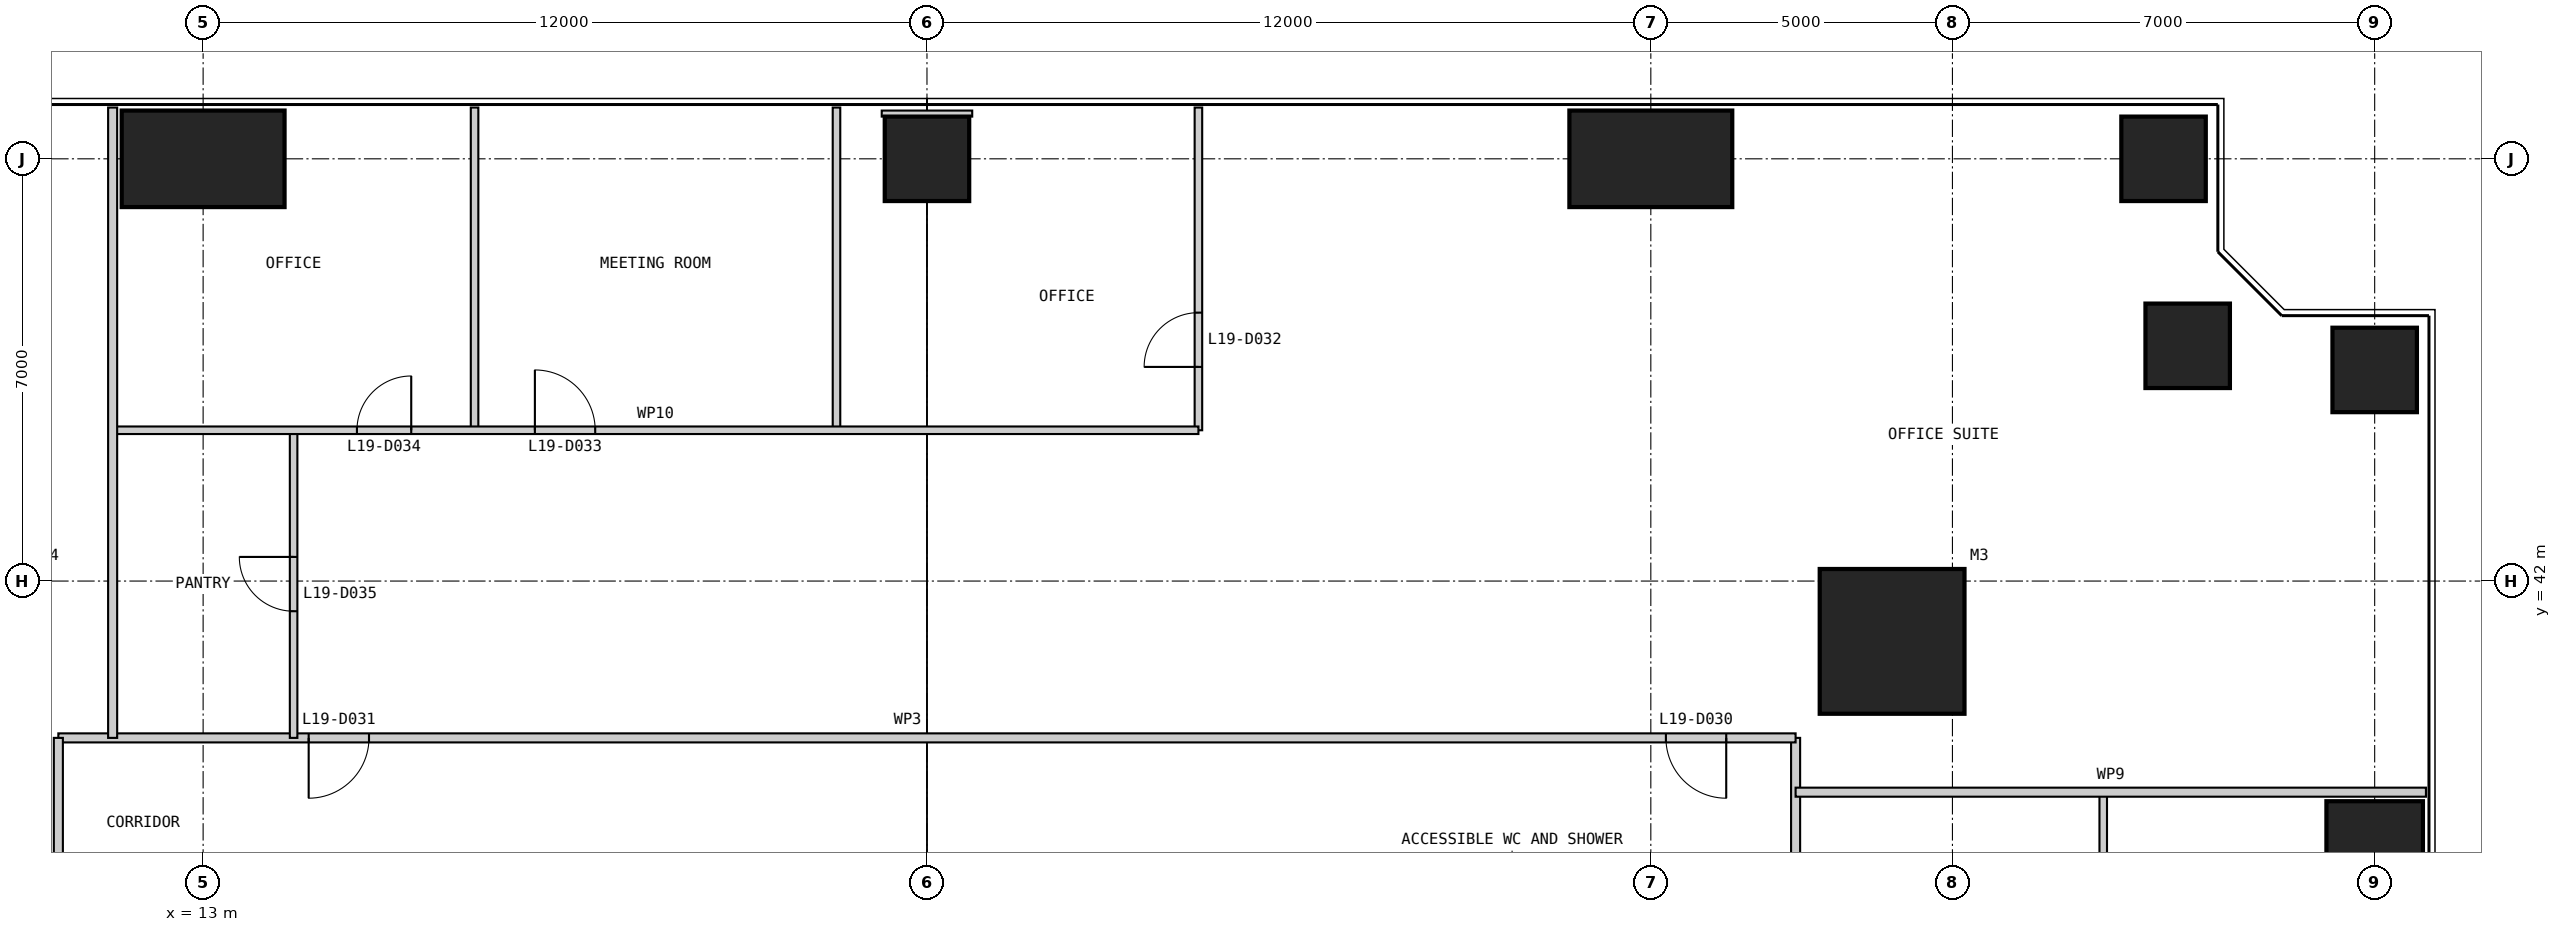
"""IFC4 building model, lengths in metres.
Left out: names, types, materials, properties, quantities, classifications, styles, units other than length and angle.
Written with IfcOpenShell. Run it as: python <this file> out.ifc"""

import sys

from ifc_helpers import new_model, si_unit, direction, frame, frame_2d, origin, origin_2d, place, context, subcontext, project, spatial, rectangle, extrude, element, fill, save


model = new_model("IFC4")
c1 = context("Model", 3, precision=1e-05, world=origin(), true_north=direction((0.0, 1.0)))
c2 = subcontext(c1, "Body", "Model", "MODEL_VIEW")
j1 = project(units=[si_unit("LENGTHUNIT", "METRE"), si_unit("PLANEANGLEUNIT", "RADIAN")], contexts=[c1])
p1 = place(None, origin())
s1 = spatial("IfcSite", under=j1, at=p1, CompositionType="ELEMENT")
p2 = place(p1, origin())
s2 = spatial("IfcBuilding", under=s1, at=p2, CompositionType="ELEMENT")
p3 = place(p2, frame((0.0, 0.0, 83.0)))
s3 = spatial("IfcBuildingStorey", under=s2, at=p3, CompositionType="ELEMENT", Elevation=83.0)
p4 = place(p3, frame((41.0, 41.0, 0.0), z_axis=(0.0, 0.0, 1.0), x_axis=(1.0, 0.0, 0.0)))
e1 = element("IfcColumn", 1, at=p4, inside=s3, PredefinedType="COLUMN", context=c2, shape_type="SweptSolid", body=[
    extrude(rectangle(XDim=2.4, YDim=2.4, at=origin_2d()), origin(), (0.0, 0.0, 1.0), 4.0),
])
p5 = place(p3, frame((49.0, 37.0, 0.0), z_axis=(0.0, 0.0, 1.0), x_axis=(1.0, 0.0, 0.0)))
e2 = element("IfcColumn", 2, at=p5, inside=s3, PredefinedType="COLUMN", context=c2, shape_type="SweptSolid", body=[
    extrude(rectangle(XDim=1.6, YDim=2.7, at=origin_2d()), origin(), (0.0, 0.0, 1.0), 4.0),
])
for number, where, z_axis, x_axis in (
    (3, (49.0, 45.5, 0.0), (0.0, 0.0, 1.0), (1.0, 0.0, 0.0)),
    (4, (45.9, 45.9, 0.0), (0.0, 0.0, 1.0), (1.0, 0.0, 0.0)),
    (5, (45.5, 49.0, 0.0), (0.0, 0.0, 1.0), (1.0, 0.0, 0.0)),
):
    element("IfcColumn", number, at=place(p3, frame(where, z_axis=z_axis, x_axis=x_axis)), inside=s3, PredefinedType="COLUMN", context=c2, shape_type="SweptSolid", body=[
        extrude(rectangle(XDim=1.4, YDim=1.4, at=origin_2d()), origin(), (0.0, 0.0, 1.0), 4.0),
    ])
p6 = place(p3, frame((37.0, 49.0, 0.0), z_axis=(0.0, 0.0, 1.0), x_axis=(1.0, 0.0, 0.0)))
e6 = element("IfcColumn", 6, at=p6, inside=s3, PredefinedType="COLUMN", context=c2, shape_type="SweptSolid", body=[
    extrude(rectangle(XDim=2.7, YDim=1.6, at=origin_2d()), origin(), (0.0, 0.0, 1.0), 4.0),
])
p7 = place(p3, frame((25.0, 49.0, 0.0), z_axis=(0.0, 0.0, 1.0), x_axis=(1.0, 0.0, 0.0)))
e7 = element("IfcColumn", 7, at=p7, inside=s3, PredefinedType="COLUMN", context=c2, shape_type="SweptSolid", body=[
    extrude(rectangle(XDim=1.4, YDim=1.4, at=origin_2d()), origin(), (0.0, 0.0, 1.0), 4.0),
])
p8 = place(p3, frame((13.0, 49.0, 0.0), z_axis=(0.0, 0.0, 1.0), x_axis=(1.0, 0.0, 0.0)))
e8 = element("IfcColumn", 8, at=p8, inside=s3, PredefinedType="COLUMN", context=c2, shape_type="SweptSolid", body=[
    extrude(rectangle(XDim=2.7, YDim=1.6, at=origin_2d()), origin(), (0.0, 0.0, 1.0), 4.0),
])
p9 = place(p3, frame((39.4, 11.5, 0.0), z_axis=(0.0, 0.0, 1.0), x_axis=(0.0, 1.0, 0.0)))
e9 = element("IfcWall", 9, at=p9, inside=s3, PredefinedType="PARTITIONING", context=c2, shape_type="SweptSolid", body=[
    extrude(rectangle(XDim=27.9, YDim=0.15, at=frame_2d((13.95, 0.0))), origin(), (0.0, 0.0, 1.0), 3.85),
])
p10 = place(p9, frame((0.25, 0.0, 0.0)))
e10 = element("IfcOpeningElement", 10, at=p10, cuts=e9, PredefinedType="OPENING", context=c2, shape_type="SweptSolid", body=[
    extrude(rectangle(XDim=1.0, YDim=2.2, at=frame_2d((0.5, 1.1))), frame((0.0, 0.085, 0.0), z_axis=(0.0, -1.0, 0.0), x_axis=(1.0, 0.0, 0.0)), (0.0, 0.0, 1.0), 0.17),
])
p11 = place(p9, frame((22.75, 0.0, 0.0)))
e11 = element("IfcOpeningElement", 11, at=p11, cuts=e9, PredefinedType="OPENING", context=c2, shape_type="SweptSolid", body=[
    extrude(rectangle(XDim=1.0, YDim=2.2, at=frame_2d((0.5, 1.1))), frame((0.0, 0.085, 0.0), z_axis=(0.0, -1.0, 0.0), x_axis=(1.0, 0.0, 0.0)), (0.0, 0.0, 1.0), 0.17),
])
p12 = place(p3, frame((44.5, 20.5, 0.0), z_axis=(0.0, 0.0, 1.0), x_axis=(0.0, 1.0, 0.0)))
e12 = element("IfcWall", 12, at=p12, inside=s3, PredefinedType="PARTITIONING", context=c2, shape_type="SweptSolid", body=[
    extrude(rectangle(XDim=18.0, YDim=0.125, at=frame_2d((9.0, 0.0))), origin(), (0.0, 0.0, 1.0), 3.85),
])
p13 = place(p12, frame((10.0, 0.0, 0.0)))
e13 = element("IfcOpeningElement", 13, at=p13, cuts=e12, PredefinedType="OPENING", context=c2, shape_type="SweptSolid", body=[
    extrude(rectangle(XDim=1.0, YDim=2.2, at=frame_2d((0.5, 1.1))), frame((0.0, 0.073, 0.0), z_axis=(0.0, -1.0, 0.0), x_axis=(1.0, 0.0, 0.0)), (0.0, 0.0, 1.0), 0.145),
])
p14 = place(p12, frame((13.05, 0.0, 0.0)))
e14 = element("IfcOpeningElement", 14, at=p14, cuts=e12, PredefinedType="OPENING", context=c2, shape_type="SweptSolid", body=[
    extrude(rectangle(XDim=0.9, YDim=2.2, at=frame_2d((0.45, 1.1))), frame((0.0, 0.073, 0.0), z_axis=(0.0, -1.0, 0.0), x_axis=(1.0, 0.0, 0.0)), (0.0, 0.0, 1.0), 0.145),
])
p15 = place(p3, frame((39.4, 39.4, 0.0), z_axis=(0.0, 0.0, 1.0), x_axis=(-1.0, 0.0, 0.0)))
e15 = element("IfcWall", 15, at=p15, inside=s3, PredefinedType="PARTITIONING", context=c2, shape_type="SweptSolid", body=[
    extrude(rectangle(XDim=28.8, YDim=0.15, at=frame_2d((14.4, 0.0))), origin(), (0.0, 0.0, 1.0), 3.85),
])
p16 = place(p15, frame((1.15, 0.0, 0.0)))
e16 = element("IfcOpeningElement", 16, at=p16, cuts=e15, PredefinedType="OPENING", context=c2, shape_type="SweptSolid", body=[
    extrude(rectangle(XDim=1.0, YDim=2.2, at=frame_2d((0.5, 1.1))), frame((0.0, 0.085, 0.0), z_axis=(0.0, -1.0, 0.0), x_axis=(1.0, 0.0, 0.0)), (0.0, 0.0, 1.0), 0.17),
])
p17 = place(p15, frame((23.65, 0.0, 0.0)))
e17 = element("IfcOpeningElement", 17, at=p17, cuts=e15, PredefinedType="OPENING", context=c2, shape_type="SweptSolid", body=[
    extrude(rectangle(XDim=1.0, YDim=2.2, at=frame_2d((0.5, 1.1))), frame((0.0, 0.085, 0.0), z_axis=(0.0, -1.0, 0.0), x_axis=(1.0, 0.0, 0.0)), (0.0, 0.0, 1.0), 0.17),
])
p18 = place(p3, frame((49.85, 38.5, 0.0), z_axis=(0.0, 0.0, 1.0), x_axis=(-1.0, 0.0, 0.0)))
e18 = element("IfcWall", 18, at=p18, inside=s3, PredefinedType="PARTITIONING", context=c2, shape_type="SweptSolid", body=[
    extrude(rectangle(XDim=10.45, YDim=0.15, at=frame_2d((5.225, 0.0))), origin(), (0.0, 0.0, 1.0), 3.85),
])
p19 = place(p3, frame((29.5, 49.85, 0.0), z_axis=(0.0, 0.0, 1.0), x_axis=(0.0, -1.0, 0.0)))
e19 = element("IfcWall", 19, at=p19, inside=s3, PredefinedType="PARTITIONING", context=c2, shape_type="SweptSolid", body=[
    extrude(rectangle(XDim=5.35, YDim=0.125, at=frame_2d((2.675, 0.0))), origin(), (0.0, 0.0, 1.0), 3.85),
])
p20 = place(p19, frame((3.4, 0.0, 0.0)))
e20 = element("IfcOpeningElement", 20, at=p20, cuts=e19, PredefinedType="OPENING", context=c2, shape_type="SweptSolid", body=[
    extrude(rectangle(XDim=0.9, YDim=2.2, at=frame_2d((0.45, 1.1))), frame((0.0, 0.073, 0.0), z_axis=(0.0, -1.0, 0.0), x_axis=(1.0, 0.0, 0.0)), (0.0, 0.0, 1.0), 0.145),
])
for number, where, z_axis, x_axis in (
    (21, (23.5, 49.85, 0.0), (0.0, 0.0, 1.0), (0.0, -1.0, 0.0)),
    (22, (17.5, 49.85, 0.0), (0.0, 0.0, 1.0), (0.0, -1.0, 0.0)),
):
    element("IfcWall", number, at=place(p3, frame(where, z_axis=z_axis, x_axis=x_axis)), inside=s3, PredefinedType="PARTITIONING", context=c2, shape_type="SweptSolid", body=[
        extrude(rectangle(XDim=5.35, YDim=0.125, at=frame_2d((2.675, 0.0))), origin(), (0.0, 0.0, 1.0), 3.85),
    ])
p21 = place(p3, frame((14.5, 44.5, 0.0), z_axis=(0.0, 0.0, 1.0), x_axis=(0.0, -1.0, 0.0)))
e23 = element("IfcWall", 23, at=p21, inside=s3, PredefinedType="PARTITIONING", context=c2, shape_type="SweptSolid", body=[
    extrude(rectangle(XDim=5.1, YDim=0.125, at=frame_2d((2.55, 0.0))), origin(), (0.0, 0.0, 1.0), 3.85),
])
p22 = place(p21, frame((2.1, 0.0, 0.0)))
e24 = element("IfcOpeningElement", 24, at=p22, cuts=e23, PredefinedType="OPENING", context=c2, shape_type="SweptSolid", body=[
    extrude(rectangle(XDim=0.9, YDim=2.2, at=frame_2d((0.45, 1.1))), frame((0.0, 0.073, 0.0), z_axis=(0.0, -1.0, 0.0), x_axis=(1.0, 0.0, 0.0)), (0.0, 0.0, 1.0), 0.145),
])
p23 = place(p3, frame((29.5, 44.5, 0.0), z_axis=(0.0, 0.0, 1.0), x_axis=(-1.0, 0.0, 0.0)))
e25 = element("IfcWall", 25, at=p23, inside=s3, PredefinedType="PARTITIONING", context=c2, shape_type="SweptSolid", body=[
    extrude(rectangle(XDim=18.0, YDim=0.125, at=frame_2d((9.0, 0.0))), origin(), (0.0, 0.0, 1.0), 3.85),
])
p24 = place(p23, frame((10.0, 0.0, 0.0)))
e26 = element("IfcOpeningElement", 26, at=p24, cuts=e25, PredefinedType="OPENING", context=c2, shape_type="SweptSolid", body=[
    extrude(rectangle(XDim=1.0, YDim=2.2, at=frame_2d((0.5, 1.1))), frame((0.0, 0.073, 0.0), z_axis=(0.0, -1.0, 0.0), x_axis=(1.0, 0.0, 0.0)), (0.0, 0.0, 1.0), 0.145),
])
p25 = place(p23, frame((13.05, 0.0, 0.0)))
e27 = element("IfcOpeningElement", 27, at=p25, cuts=e25, PredefinedType="OPENING", context=c2, shape_type="SweptSolid", body=[
    extrude(rectangle(XDim=0.9, YDim=2.2, at=frame_2d((0.45, 1.1))), frame((0.0, 0.073, 0.0), z_axis=(0.0, -1.0, 0.0), x_axis=(1.0, 0.0, 0.0)), (0.0, 0.0, 1.0), 0.145),
])
p26 = place(p3, frame((10.6, 39.4, 0.0), z_axis=(0.0, 0.0, 1.0), x_axis=(0.0, -1.0, 0.0)))
e28 = element("IfcWall", 28, at=p26, inside=s3, PredefinedType="PARTITIONING", context=c2, shape_type="SweptSolid", body=[
    extrude(rectangle(XDim=27.9, YDim=0.15, at=frame_2d((13.95, 0.0))), origin(), (0.0, 0.0, 1.0), 3.85),
])
p27 = place(p26, frame((3.4, 0.0, 0.0)))
e29 = element("IfcOpeningElement", 29, at=p27, cuts=e28, PredefinedType="OPENING", context=c2, shape_type="SweptSolid", body=[
    extrude(rectangle(XDim=1.0, YDim=2.2, at=frame_2d((0.5, 1.1))), frame((0.0, 0.085, 0.0), z_axis=(0.0, -1.0, 0.0), x_axis=(1.0, 0.0, 0.0)), (0.0, 0.0, 1.0), 0.17),
])
p28 = place(p26, frame((10.15, 0.0, 0.0)))
e30 = element("IfcOpeningElement", 30, at=p28, cuts=e28, PredefinedType="OPENING", context=c2, shape_type="SweptSolid", body=[
    extrude(rectangle(XDim=1.0, YDim=2.2, at=frame_2d((0.5, 1.1))), frame((0.0, 0.085, 0.0), z_axis=(0.0, -1.0, 0.0), x_axis=(1.0, 0.0, 0.0)), (0.0, 0.0, 1.0), 0.17),
])
p29 = place(p26, frame((17.65, 0.0, 0.0)))
e31 = element("IfcOpeningElement", 31, at=p29, cuts=e28, PredefinedType="OPENING", context=c2, shape_type="SweptSolid", body=[
    extrude(rectangle(XDim=1.0, YDim=2.2, at=frame_2d((0.5, 1.1))), frame((0.0, 0.085, 0.0), z_axis=(0.0, -1.0, 0.0), x_axis=(1.0, 0.0, 0.0)), (0.0, 0.0, 1.0), 0.17),
])
p30 = place(p26, frame((24.4, 0.0, 0.0)))
e32 = element("IfcOpeningElement", 32, at=p30, cuts=e28, PredefinedType="OPENING", context=c2, shape_type="SweptSolid", body=[
    extrude(rectangle(XDim=1.0, YDim=2.2, at=frame_2d((0.5, 1.1))), frame((0.0, 0.085, 0.0), z_axis=(0.0, -1.0, 0.0), x_axis=(1.0, 0.0, 0.0)), (0.0, 0.0, 1.0), 0.17),
])
p31 = place(p3, frame((11.5, 49.85, 0.0), z_axis=(0.0, 0.0, 1.0), x_axis=(0.0, -1.0, 0.0)))
e33 = element("IfcWall", 33, at=p31, inside=s3, PredefinedType="PARTITIONING", context=c2, shape_type="SweptSolid", body=[
    extrude(rectangle(XDim=10.45, YDim=0.15, at=frame_2d((5.225, 0.0))), origin(), (0.0, 0.0, 1.0), 3.85),
])
p32 = place(p3, frame((25.0, 49.8, 0.0), z_axis=(0.0, 0.0, 1.0), x_axis=(0.0, -1.0, 0.0)))
e34 = element("IfcWall", 34, at=p32, inside=s3, PredefinedType="PARTITIONING", context=c2, shape_type="SweptSolid", body=[
    extrude(rectangle(XDim=0.1, YDim=1.5, at=frame_2d((0.05, 0.0))), origin(), (0.0, 0.0, 1.0), 3.85),
])
p33 = place(p16, origin())
e35 = element("IfcDoor", 35, at=p33, inside=s3, OperationType="SINGLE_SWING_LEFT", PredefinedType="DOOR", context=c2, shape_type="SweptSolid", body=[
    extrude(rectangle(XDim=1.0, YDim=2.2, at=frame_2d((0.5, 1.1))), frame((0.0, 0.025, 0.0), z_axis=(0.0, -1.0, 0.0), x_axis=(1.0, 0.0, 0.0)), (0.0, 0.0, 1.0), 0.05),
])
fill(e16, e35)
p34 = place(p17, origin())
e36 = element("IfcDoor", 36, at=p34, inside=s3, OperationType="SINGLE_SWING_RIGHT", PredefinedType="DOOR", context=c2, shape_type="SweptSolid", body=[
    extrude(rectangle(XDim=1.0, YDim=2.2, at=frame_2d((0.5, 1.1))), frame((0.0, 0.025, 0.0), z_axis=(0.0, -1.0, 0.0), x_axis=(1.0, 0.0, 0.0)), (0.0, 0.0, 1.0), 0.05),
])
fill(e17, e36)
p35 = place(p20, frame((0.9, 0.0, 0.0), z_axis=(0.0, 0.0, 1.0), x_axis=(-1.0, 0.0, 0.0)))
e37 = element("IfcDoor", 37, at=p35, inside=s3, OperationType="SINGLE_SWING_LEFT", PredefinedType="DOOR", context=c2, shape_type="SweptSolid", body=[
    extrude(rectangle(XDim=0.9, YDim=2.2, at=frame_2d((0.45, 1.1))), frame((0.0, 0.025, 0.0), z_axis=(0.0, -1.0, 0.0), x_axis=(1.0, 0.0, 0.0)), (0.0, 0.0, 1.0), 0.05),
])
fill(e20, e37)
p36 = place(p24, frame((1.0, 0.0, 0.0), z_axis=(0.0, 0.0, 1.0), x_axis=(-1.0, 0.0, 0.0)))
e38 = element("IfcDoor", 38, at=p36, inside=s3, OperationType="SINGLE_SWING_LEFT", PredefinedType="DOOR", context=c2, shape_type="SweptSolid", body=[
    extrude(rectangle(XDim=1.0, YDim=2.2, at=frame_2d((0.5, 1.1))), frame((0.0, 0.025, 0.0), z_axis=(0.0, -1.0, 0.0), x_axis=(1.0, 0.0, 0.0)), (0.0, 0.0, 1.0), 0.05),
])
fill(e26, e38)
p37 = place(p25, frame((0.9, 0.0, 0.0), z_axis=(0.0, 0.0, 1.0), x_axis=(-1.0, 0.0, 0.0)))
e39 = element("IfcDoor", 39, at=p37, inside=s3, OperationType="SINGLE_SWING_RIGHT", PredefinedType="DOOR", context=c2, shape_type="SweptSolid", body=[
    extrude(rectangle(XDim=0.9, YDim=2.2, at=frame_2d((0.45, 1.1))), frame((0.0, 0.025, 0.0), z_axis=(0.0, -1.0, 0.0), x_axis=(1.0, 0.0, 0.0)), (0.0, 0.0, 1.0), 0.05),
])
fill(e27, e39)
p38 = place(p22, frame((0.9, 0.0, 0.0), z_axis=(0.0, 0.0, 1.0), x_axis=(-1.0, 0.0, 0.0)))
e40 = element("IfcDoor", 40, at=p38, inside=s3, OperationType="SINGLE_SWING_RIGHT", PredefinedType="DOOR", context=c2, shape_type="SweptSolid", body=[
    extrude(rectangle(XDim=0.9, YDim=2.2, at=frame_2d((0.45, 1.1))), frame((0.0, 0.025, 0.0), z_axis=(0.0, -1.0, 0.0), x_axis=(1.0, 0.0, 0.0)), (0.0, 0.0, 1.0), 0.05),
])
fill(e24, e40)
save(model, sys.argv[1])
